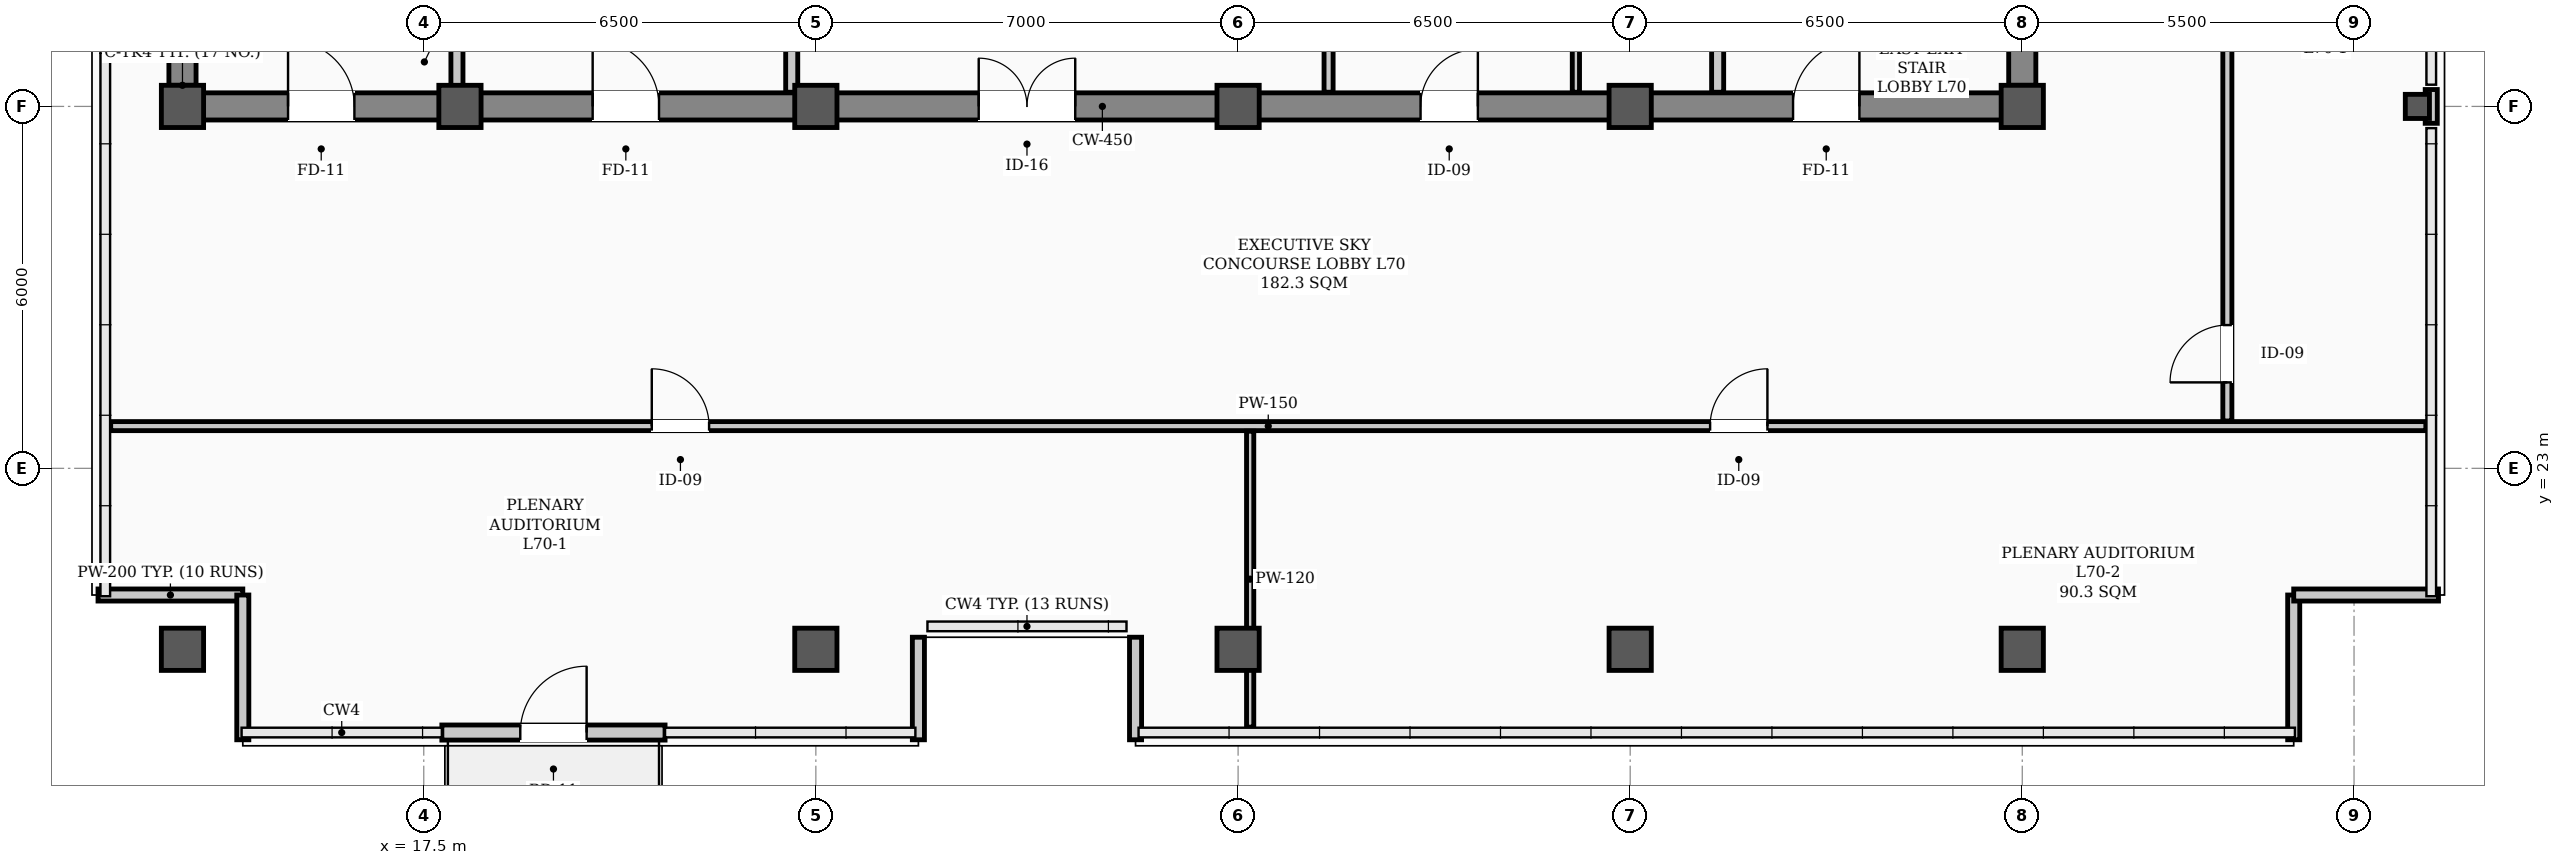
"""IFC4 building model, lengths in metres.
Left out: names, types, materials, properties, quantities, classifications, styles, units other than length and angle.
Written with IfcOpenShell. Run it as: python <this file> out.ifc"""

import sys

from ifc_helpers import new_model, si_unit, direction, frame, frame_2d, origin, origin_2d, place, context, subcontext, project, spatial, rectangle, hollow_rectangle, extrude, element, fill, save


model = new_model("IFC4")
c1 = context("Model", 3, precision=1e-05, world=origin(), true_north=direction((0.0, 1.0)))
c2 = subcontext(c1, "Body", "Model", "MODEL_VIEW")
j1 = project(units=[si_unit("LENGTHUNIT", "METRE"), si_unit("PLANEANGLEUNIT", "RADIAN")], contexts=[c1])
p1 = place(None, origin())
s1 = spatial("IfcSite", under=j1, at=p1, CompositionType="ELEMENT")
p2 = place(p1, origin())
s2 = spatial("IfcBuilding", under=s1, at=p2, CompositionType="ELEMENT")
p3 = place(p2, frame((0.0, 0.0, 281.3)))
s3 = spatial("IfcBuildingStorey", under=s2, at=p3, CompositionType="ELEMENT", Elevation=281.3)
for number, where, z_axis, x_axis in (
    (1, (13.5, 29.0, 0.0), (0.0, 0.0, 1.0), (1.0, 0.0, 0.0)),
    (2, (18.1, 29.0, 0.0), (0.0, 0.0, 1.0), (1.0, 0.0, 0.0)),
    (3, (24.0, 29.0, 0.0), (0.0, 0.0, 1.0), (1.0, 0.0, 0.0)),
    (4, (31.0, 29.0, 0.0), (0.0, 0.0, 1.0), (1.0, 0.0, 0.0)),
    (5, (37.5, 29.0, 0.0), (0.0, 0.0, 1.0), (1.0, 0.0, 0.0)),
    (6, (44.0, 29.0, 0.0), (0.0, 0.0, 1.0), (1.0, 0.0, 0.0)),
    (7, (13.5, 20.0, 0.0), (0.0, 0.0, 1.0), (1.0, 0.0, 0.0)),
    (8, (24.0, 20.0, 0.0), (0.0, 0.0, 1.0), (1.0, 0.0, 0.0)),
    (9, (31.0, 20.0, 0.0), (0.0, 0.0, 1.0), (1.0, 0.0, 0.0)),
    (10, (37.5, 20.0, 0.0), (0.0, 0.0, 1.0), (1.0, 0.0, 0.0)),
    (11, (44.0, 20.0, 0.0), (0.0, 0.0, 1.0), (1.0, 0.0, 0.0)),
):
    element("IfcColumn", number, at=place(p3, frame(where, z_axis=z_axis, x_axis=x_axis)), inside=s3, PredefinedType="COLUMN", context=c2, shape_type="SweptSolid", body=[
        extrude(hollow_rectangle(XDim=0.7, YDim=0.7, WallThickness=0.028, InnerFilletRadius=0.014, OuterFilletRadius=0.042, at=origin_2d()), origin(), (0.0, 0.0, 1.0), 3.9),
    ])
p4 = place(p3, frame((50.55, 29.0, 0.0), z_axis=(0.0, 0.0, 1.0), x_axis=(1.0, 0.0, 0.0)))
e12 = element("IfcColumn", 12, at=p4, inside=s3, PredefinedType="COLUMN", context=c2, shape_type="SweptSolid", body=[
    extrude(hollow_rectangle(XDim=0.4, YDim=0.4, WallThickness=0.02, InnerFilletRadius=0.02, OuterFilletRadius=0.04, at=origin_2d()), origin(), (0.0, 0.0, 1.0), 3.9),
])
p5 = place(p3, frame((50.78, 28.72, 0.0), z_axis=(0.0, 0.0, 1.0), x_axis=(0.0, 1.0, 0.0)))
e13 = element("IfcWall", 13, at=p5, inside=s3, PredefinedType="PARAPET", context=c2, shape_type="SweptSolid", body=[
    extrude(rectangle(XDim=0.56, YDim=0.2, at=frame_2d((0.28, 0.0))), origin(), (0.0, 0.0, 1.0), 1.2),
])
for number, where, z_axis, x_axis in (
    (14, (12.1, 20.9, 0.0), (0.0, 0.0, 1.0), (1.0, 0.0, 0.0)),
    (15, (14.5, 20.9, 0.0), (0.0, 0.0, 1.0), (0.0, -1.0, 0.0)),
    (16, (48.5, 18.5, 0.0), (0.0, 0.0, 1.0), (0.0, 1.0, 0.0)),
    (17, (48.5, 20.9, 0.0), (0.0, 0.0, 1.0), (1.0, 0.0, 0.0)),
):
    element("IfcWall", number, at=place(p3, frame(where, z_axis=z_axis, x_axis=x_axis)), inside=s3, PredefinedType="PARAPET", context=c2, shape_type="SweptSolid", body=[
        extrude(rectangle(XDim=2.4, YDim=0.2, at=frame_2d((1.2, 0.0))), origin(), (0.0, 0.0, 1.0), 1.2),
    ])
for number, where, z_axis, x_axis in (
    (18, (25.7, 18.5, 0.0), (0.0, 0.0, 1.0), (0.0, 1.0, 0.0)),
    (19, (29.3, 20.2, 0.0), (0.0, 0.0, 1.0), (0.0, -1.0, 0.0)),
):
    element("IfcWall", number, at=place(p3, frame(where, z_axis=z_axis, x_axis=x_axis)), inside=s3, PredefinedType="PARAPET", context=c2, shape_type="SweptSolid", body=[
        extrude(rectangle(XDim=1.7, YDim=0.2, at=frame_2d((0.85, 0.0))), origin(), (0.0, 0.0, 1.0), 1.2),
    ])
p6 = place(p3, frame((17.8, 18.62, 0.0), z_axis=(0.0, 0.0, 1.0), x_axis=(1.0, 0.0, 0.0)))
e20 = element("IfcWall", 20, at=p6, inside=s3, PredefinedType="STANDARD", context=c2, shape_type="SweptSolid", body=[
    extrude(rectangle(XDim=3.7, YDim=0.25, at=frame_2d((1.85, 0.0))), origin(), (0.0, 0.0, 1.0), 3.18),
])
p7 = place(p6, frame((1.3, 0.0, 0.0)))
e21 = element("IfcOpeningElement", 21, at=p7, cuts=e20, PredefinedType="OPENING", context=c2, shape_type="SweptSolid", body=[
    extrude(rectangle(XDim=1.1, YDim=2.2, at=frame_2d((0.55, 1.1))), frame((0.0, 0.135, 0.0), z_axis=(0.0, -1.0, 0.0), x_axis=(1.0, 0.0, 0.0)), (0.0, 0.0, 1.0), 0.27),
])
p8 = place(p3, frame((13.5, 29.0, 0.0), z_axis=(0.0, 0.0, 1.0), x_axis=(1.0, 0.0, 0.0)))
e22 = element("IfcWall", 22, at=p8, inside=s3, PredefinedType="SHEAR", context=c2, shape_type="SweptSolid", body=[
    extrude(rectangle(XDim=30.5, YDim=0.45, at=frame_2d((15.25, 0.0))), origin(), (0.0, 0.0, 1.0), 3.72),
])
p9 = place(p8, frame((1.75, 0.0, 0.0)))
e23 = element("IfcOpeningElement", 23, at=p9, cuts=e22, PredefinedType="OPENING", context=c2, shape_type="SweptSolid", body=[
    extrude(rectangle(XDim=1.1, YDim=2.08, at=frame_2d((0.55, 1.04))), frame((0.0, 0.235, 0.0), z_axis=(0.0, -1.0, 0.0), x_axis=(1.0, 0.0, 0.0)), (0.0, 0.0, 1.0), 0.47),
])
p10 = place(p8, frame((26.7, 0.0, 0.0)))
e24 = element("IfcOpeningElement", 24, at=p10, cuts=e22, PredefinedType="OPENING", context=c2, shape_type="SweptSolid", body=[
    extrude(rectangle(XDim=1.1, YDim=2.08, at=frame_2d((0.55, 1.04))), frame((0.0, 0.235, 0.0), z_axis=(0.0, -1.0, 0.0), x_axis=(1.0, 0.0, 0.0)), (0.0, 0.0, 1.0), 0.47),
])
p11 = place(p8, frame((6.8, 0.0, 0.0)))
e25 = element("IfcOpeningElement", 25, at=p11, cuts=e22, PredefinedType="OPENING", context=c2, shape_type="SweptSolid", body=[
    extrude(rectangle(XDim=1.1, YDim=2.08, at=frame_2d((0.55, 1.04))), frame((0.0, 0.235, 0.0), z_axis=(0.0, -1.0, 0.0), x_axis=(1.0, 0.0, 0.0)), (0.0, 0.0, 1.0), 0.47),
])
p12 = place(p8, frame((13.2, 0.0, 0.0)))
e26 = element("IfcOpeningElement", 26, at=p12, cuts=e22, PredefinedType="OPENING", context=c2, shape_type="SweptSolid", body=[
    extrude(rectangle(XDim=1.6, YDim=2.08, at=frame_2d((0.8, 1.04))), frame((0.0, 0.235, 0.0), z_axis=(0.0, -1.0, 0.0), x_axis=(1.0, 0.0, 0.0)), (0.0, 0.0, 1.0), 0.47),
])
p13 = place(p8, frame((20.525, 0.0, 0.0)))
e27 = element("IfcOpeningElement", 27, at=p13, cuts=e22, PredefinedType="OPENING", context=c2, shape_type="SweptSolid", body=[
    extrude(rectangle(XDim=0.95, YDim=2.08, at=frame_2d((0.475, 1.04))), frame((0.0, 0.235, 0.0), z_axis=(0.0, -1.0, 0.0), x_axis=(1.0, 0.0, 0.0)), (0.0, 0.0, 1.0), 0.47),
])
for number, where, z_axis, x_axis in (
    (28, (13.5, 29.35, 0.0), (0.0, 0.0, 1.0), (0.0, 1.0, 0.0)),
    (29, (44.0, 29.35, 0.0), (0.0, 0.0, 1.0), (0.0, 1.0, 0.0)),
):
    element("IfcWall", number, at=place(p3, frame(where, z_axis=z_axis, x_axis=x_axis)), inside=s3, PredefinedType="SHEAR", context=c2, shape_type="SweptSolid", body=[
        extrude(rectangle(XDim=8.6, YDim=0.45, at=frame_2d((4.3, 0.0))), origin(), (0.0, 0.0, 1.0), 3.72),
    ])
p14 = place(p3, frame((12.31, 23.7, 0.0), z_axis=(0.0, 0.0, 1.0), x_axis=(1.0, 0.0, 0.0)))
e30 = element("IfcWall", 30, at=p14, inside=s3, PredefinedType="PARTITIONING", context=c2, shape_type="SweptSolid", body=[
    extrude(rectangle(XDim=38.38, YDim=0.15, at=frame_2d((19.19, 0.0))), origin(), (0.0, 0.0, 1.0), 3.2),
])
p15 = place(p14, frame((8.97, 0.0, 0.0)))
e31 = element("IfcOpeningElement", 31, at=p15, cuts=e30, PredefinedType="OPENING", context=c2, shape_type="SweptSolid", body=[
    extrude(rectangle(XDim=0.95, YDim=2.08, at=frame_2d((0.475, 1.04))), frame((0.0, 0.085, 0.0), z_axis=(0.0, -1.0, 0.0), x_axis=(1.0, 0.0, 0.0)), (0.0, 0.0, 1.0), 0.17),
])
p16 = place(p14, frame((26.515, 0.0, 0.0)))
e32 = element("IfcOpeningElement", 32, at=p16, cuts=e30, PredefinedType="OPENING", context=c2, shape_type="SweptSolid", body=[
    extrude(rectangle(XDim=0.95, YDim=2.08, at=frame_2d((0.475, 1.04))), frame((0.0, 0.085, 0.0), z_axis=(0.0, -1.0, 0.0), x_axis=(1.0, 0.0, 0.0)), (0.0, 0.0, 1.0), 0.17),
])
p17 = place(p3, frame((18.05, 29.235, 0.0), z_axis=(0.0, 0.0, 1.0), x_axis=(0.0, 1.0, 0.0)))
e33 = element("IfcWall", 33, at=p17, inside=s3, PredefinedType="STANDARD", context=c2, shape_type="SweptSolid", body=[
    extrude(rectangle(XDim=1.065, YDim=0.2, at=frame_2d((0.532, 0.0))), origin(), (0.0, 0.0, 1.0), 3.72),
])
p18 = place(p3, frame((38.95, 29.235, 0.0), z_axis=(0.0, 0.0, 1.0), x_axis=(0.0, 1.0, 0.0)))
e34 = element("IfcWall", 34, at=p18, inside=s3, PredefinedType="STANDARD", context=c2, shape_type="SweptSolid", body=[
    extrude(rectangle(XDim=1.065, YDim=0.2, at=frame_2d((0.532, 0.0))), origin(), (0.0, 0.0, 1.0), 3.4),
])
p19 = place(p3, frame((23.6, 29.235, 0.0), z_axis=(0.0, 0.0, 1.0), x_axis=(0.0, 1.0, 0.0)))
e35 = element("IfcWall", 35, at=p19, inside=s3, PredefinedType="STANDARD", context=c2, shape_type="SweptSolid", body=[
    extrude(rectangle(XDim=5.465, YDim=0.2, at=frame_2d((2.732, 0.0))), origin(), (0.0, 0.0, 1.0), 3.2),
])
p20 = place(p3, frame((32.5, 29.235, 0.0), z_axis=(0.0, 0.0, 1.0), x_axis=(0.0, 1.0, 0.0)))
e36 = element("IfcWall", 36, at=p20, inside=s3, PredefinedType="PARTITIONING", context=c2, shape_type="SweptSolid", body=[
    extrude(rectangle(XDim=2.53, YDim=0.15, at=frame_2d((1.265, 0.0))), origin(), (0.0, 0.0, 1.0), 3.4),
])
p21 = place(p3, frame((36.6, 29.235, 0.0), z_axis=(0.0, 0.0, 1.0), x_axis=(0.0, 1.0, 0.0)))
e37 = element("IfcWall", 37, at=p21, inside=s3, PredefinedType="PARTITIONING", context=c2, shape_type="SweptSolid", body=[
    extrude(rectangle(XDim=2.53, YDim=0.12, at=frame_2d((1.265, 0.0))), origin(), (0.0, 0.0, 1.0), 3.4),
])
p22 = place(p3, frame((47.4, 23.785, 0.0), z_axis=(0.0, 0.0, 1.0), x_axis=(0.0, 1.0, 0.0)))
e38 = element("IfcWall", 38, at=p22, inside=s3, PredefinedType="PARTITIONING", context=c2, shape_type="SweptSolid", body=[
    extrude(rectangle(XDim=17.88, YDim=0.15, at=frame_2d((8.94, 0.0))), origin(), (0.0, 0.0, 1.0), 3.1),
])
p23 = place(p22, frame((0.64, 0.0, 0.0)))
e39 = element("IfcOpeningElement", 39, at=p23, cuts=e38, PredefinedType="OPENING", context=c2, shape_type="SweptSolid", body=[
    extrude(rectangle(XDim=0.95, YDim=2.08, at=frame_2d((0.475, 1.04))), frame((0.0, 0.085, 0.0), z_axis=(0.0, -1.0, 0.0), x_axis=(1.0, 0.0, 0.0)), (0.0, 0.0, 1.0), 0.17),
])
p24 = place(p22, frame((13.615, 0.0, 0.0)))
e40 = element("IfcOpeningElement", 40, at=p24, cuts=e38, PredefinedType="OPENING", context=c2, shape_type="SweptSolid", body=[
    extrude(rectangle(XDim=0.95, YDim=2.08, at=frame_2d((0.475, 1.04))), frame((0.0, 0.085, 0.0), z_axis=(0.0, -1.0, 0.0), x_axis=(1.0, 0.0, 0.0)), (0.0, 0.0, 1.0), 0.17),
])
p25 = place(p3, frame((31.2, 18.71, 0.0), z_axis=(0.0, 0.0, 1.0), x_axis=(0.0, 1.0, 0.0)))
e41 = element("IfcWall", 41, at=p25, inside=s3, PredefinedType="PARTITIONING", context=c2, shape_type="SweptSolid", body=[
    extrude(rectangle(XDim=4.905, YDim=0.12, at=frame_2d((2.453, 0.0))), origin(), (0.0, 0.0, 1.0), 3.1),
])
p26 = place(p7, origin())
e42 = element("IfcDoor", 42, at=p26, inside=s3, OperationType="SINGLE_SWING_RIGHT", PredefinedType="DOOR", context=c2, shape_type="SweptSolid", body=[
    extrude(rectangle(XDim=1.1, YDim=2.2, at=frame_2d((0.55, 1.1))), frame((0.0, 0.025, 0.0), z_axis=(0.0, -1.0, 0.0), x_axis=(1.0, 0.0, 0.0)), (0.0, 0.0, 1.0), 0.05),
])
fill(e21, e42)
p27 = place(p9, origin())
e43 = element("IfcDoor", 43, at=p27, inside=s3, OperationType="SINGLE_SWING_LEFT", PredefinedType="DOOR", context=c2, shape_type="SweptSolid", body=[
    extrude(rectangle(XDim=1.1, YDim=2.08, at=frame_2d((0.55, 1.04))), frame((0.0, 0.025, 0.0), z_axis=(0.0, -1.0, 0.0), x_axis=(1.0, 0.0, 0.0)), (0.0, 0.0, 1.0), 0.05),
])
fill(e23, e43)
p28 = place(p10, origin())
e44 = element("IfcDoor", 44, at=p28, inside=s3, OperationType="SINGLE_SWING_RIGHT", PredefinedType="DOOR", context=c2, shape_type="SweptSolid", body=[
    extrude(rectangle(XDim=1.1, YDim=2.08, at=frame_2d((0.55, 1.04))), frame((0.0, 0.025, 0.0), z_axis=(0.0, -1.0, 0.0), x_axis=(1.0, 0.0, 0.0)), (0.0, 0.0, 1.0), 0.05),
])
fill(e24, e44)
p29 = place(p11, origin())
e45 = element("IfcDoor", 45, at=p29, inside=s3, OperationType="SINGLE_SWING_LEFT", PredefinedType="DOOR", context=c2, shape_type="SweptSolid", body=[
    extrude(rectangle(XDim=1.1, YDim=2.08, at=frame_2d((0.55, 1.04))), frame((0.0, 0.025, 0.0), z_axis=(0.0, -1.0, 0.0), x_axis=(1.0, 0.0, 0.0)), (0.0, 0.0, 1.0), 0.05),
])
fill(e25, e45)
p30 = place(p12, origin())
e46 = element("IfcDoor", 46, at=p30, inside=s3, OperationType="DOUBLE_DOOR_SINGLE_SWING", PredefinedType="DOOR", context=c2, shape_type="SweptSolid", body=[
    extrude(rectangle(XDim=1.6, YDim=2.08, at=frame_2d((0.8, 1.04))), frame((0.0, 0.025, 0.0), z_axis=(0.0, -1.0, 0.0), x_axis=(1.0, 0.0, 0.0)), (0.0, 0.0, 1.0), 0.05),
])
fill(e26, e46)
p31 = place(p13, origin())
e47 = element("IfcDoor", 47, at=p31, inside=s3, OperationType="SINGLE_SWING_RIGHT", PredefinedType="DOOR", context=c2, shape_type="SweptSolid", body=[
    extrude(rectangle(XDim=0.95, YDim=2.08, at=frame_2d((0.475, 1.04))), frame((0.0, 0.025, 0.0), z_axis=(0.0, -1.0, 0.0), x_axis=(1.0, 0.0, 0.0)), (0.0, 0.0, 1.0), 0.05),
])
fill(e27, e47)
p32 = place(p15, origin())
e48 = element("IfcDoor", 48, at=p32, inside=s3, OperationType="SINGLE_SWING_LEFT", PredefinedType="DOOR", context=c2, shape_type="SweptSolid", body=[
    extrude(rectangle(XDim=0.95, YDim=2.08, at=frame_2d((0.475, 1.04))), frame((0.0, 0.025, 0.0), z_axis=(0.0, -1.0, 0.0), x_axis=(1.0, 0.0, 0.0)), (0.0, 0.0, 1.0), 0.05),
])
fill(e31, e48)
p33 = place(p16, origin())
e49 = element("IfcDoor", 49, at=p33, inside=s3, OperationType="SINGLE_SWING_RIGHT", PredefinedType="DOOR", context=c2, shape_type="SweptSolid", body=[
    extrude(rectangle(XDim=0.95, YDim=2.08, at=frame_2d((0.475, 1.04))), frame((0.0, 0.025, 0.0), z_axis=(0.0, -1.0, 0.0), x_axis=(1.0, 0.0, 0.0)), (0.0, 0.0, 1.0), 0.05),
])
fill(e32, e49)
p34 = place(p23, origin())
e50 = element("IfcDoor", 50, at=p34, inside=s3, OperationType="SINGLE_SWING_LEFT", PredefinedType="DOOR", context=c2, shape_type="SweptSolid", body=[
    extrude(rectangle(XDim=0.95, YDim=2.08, at=frame_2d((0.475, 1.04))), frame((0.0, 0.025, 0.0), z_axis=(0.0, -1.0, 0.0), x_axis=(1.0, 0.0, 0.0)), (0.0, 0.0, 1.0), 0.05),
])
fill(e39, e50)
save(model, sys.argv[1])
